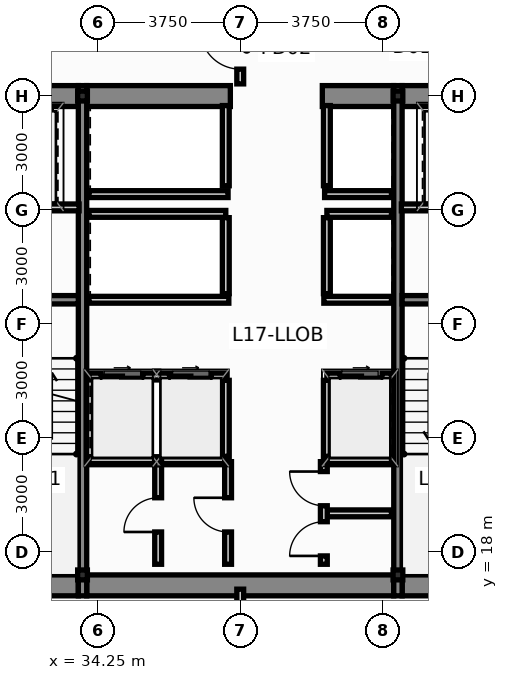
"""IFC4 building model, lengths in metres.
Left out: names, types, materials, properties, quantities, classifications, styles, units other than length and angle.
Written with IfcOpenShell. Run it as: python <this file> out.ifc"""

import sys

from ifc_helpers import new_model, si_unit, direction, frame, frame_2d, origin, origin_2d, place, context, subcontext, project, spatial, rectangle, i_section, extrude, source, transform, mapped, element, fill, save


model = new_model("IFC4")
c1 = context("Model", 3, precision=1e-05, world=origin(), true_north=direction((0.0, 1.0)))
c2 = subcontext(c1, "Body", "Model", "MODEL_VIEW")
j1 = project(units=[si_unit("LENGTHUNIT", "METRE"), si_unit("PLANEANGLEUNIT", "RADIAN")], contexts=[c1])
p1 = place(None, origin())
s1 = spatial("IfcSite", under=j1, at=p1, CompositionType="ELEMENT")
p2 = place(p1, origin())
s2 = spatial("IfcBuilding", under=s1, at=p2, CompositionType="ELEMENT")
p3 = place(p2, frame((0.0, 0.0, 67.75)))
s3 = spatial("IfcBuildingStorey", under=s2, at=p3, CompositionType="ELEMENT", Elevation=67.75)
m1 = source(origin(), c2, "Body", "SweptSolid", [
    extrude(i_section(OverallWidth=0.256, OverallDepth=0.26, WebThickness=0.01, FlangeThickness=0.017, at=origin_2d()), origin(), (0.0, 0.0, 1.0), 3.65),
])
for number, where, z_axis, x_axis in (
    (1, (33.85, 17.4, 0.0), (0.0, 0.0, 1.0), (1.0, 0.0, 0.0)),
    (2, (42.15, 17.4, 0.0), (0.0, 0.0, 1.0), (1.0, 0.0, 0.0)),
    (3, (33.85, 30.0, 0.0), (0.0, 0.0, 1.0), (1.0, 0.0, 0.0)),
    (4, (42.15, 30.0, 0.0), (0.0, 0.0, 1.0), (1.0, 0.0, 0.0)),
):
    element("IfcColumn", number, at=place(p3, frame(where, z_axis=z_axis, x_axis=x_axis)), inside=s3, PredefinedType="COLUMN", context=c2, shape_type="MappedRepresentation", body=[
        mapped(m1, transform((0.0, 0.0, 0.0), scale=1.0)),
    ])
p4 = place(p3, frame((30.84, 17.125, 0.0), z_axis=(0.0, 0.0, 1.0), x_axis=(1.0, 0.0, 0.0)))
e5 = element("IfcWall", 5, at=p4, inside=s3, PredefinedType="SHEAR", context=c2, shape_type="SweptSolid", body=[
    extrude(rectangle(XDim=2.9, YDim=0.55, at=frame_2d((1.45, 0.0))), origin(), (0.0, 0.0, 1.0), 3.65),
])
p5 = place(p3, frame((33.96, 17.125, 0.0), z_axis=(0.0, 0.0, 1.0), x_axis=(1.0, 0.0, 0.0)))
e6 = element("IfcWall", 6, at=p5, inside=s3, PredefinedType="SHEAR", context=c2, shape_type="SweptSolid", body=[
    extrude(rectangle(XDim=8.08, YDim=0.55, at=frame_2d((4.04, 0.0))), origin(), (0.0, 0.0, 1.0), 3.65),
])
for number, where, z_axis, x_axis in (
    (7, (42.26, 17.125, 0.0), (0.0, 0.0, 1.0), (1.0, 0.0, 0.0)),
    (8, (30.84, 30.0, 0.0), (0.0, 0.0, 1.0), (1.0, 0.0, 0.0)),
):
    element("IfcWall", number, at=place(p3, frame(where, z_axis=z_axis, x_axis=x_axis)), inside=s3, PredefinedType="SHEAR", context=c2, shape_type="SweptSolid", body=[
        extrude(rectangle(XDim=2.9, YDim=0.55, at=frame_2d((1.45, 0.0))), origin(), (0.0, 0.0, 1.0), 3.65),
    ])
p6 = place(p3, frame((33.96, 30.0, 0.0), z_axis=(0.0, 0.0, 1.0), x_axis=(1.0, 0.0, 0.0)))
e9 = element("IfcWall", 9, at=p6, inside=s3, PredefinedType="SHEAR", context=c2, shape_type="SweptSolid", body=[
    extrude(rectangle(XDim=3.78, YDim=0.55, at=frame_2d((1.89, 0.0))), origin(), (0.0, 0.0, 1.0), 3.65),
])
p7 = place(p3, frame((40.16, 30.0, 0.0), z_axis=(0.0, 0.0, 1.0), x_axis=(1.0, 0.0, 0.0)))
e10 = element("IfcWall", 10, at=p7, inside=s3, PredefinedType="SHEAR", context=c2, shape_type="SweptSolid", body=[
    extrude(rectangle(XDim=1.88, YDim=0.55, at=frame_2d((0.94, 0.0))), origin(), (0.0, 0.0, 1.0), 3.65),
])
p8 = place(p3, frame((42.26, 30.0, 0.0), z_axis=(0.0, 0.0, 1.0), x_axis=(1.0, 0.0, 0.0)))
e11 = element("IfcWall", 11, at=p8, inside=s3, PredefinedType="SHEAR", context=c2, shape_type="SweptSolid", body=[
    extrude(rectangle(XDim=2.9, YDim=0.55, at=frame_2d((1.45, 0.0))), origin(), (0.0, 0.0, 1.0), 3.65),
])
for number, where, z_axis, x_axis in (
    (12, (33.85, 16.85, 0.0), (0.0, 0.0, 1.0), (0.0, 1.0, 0.0)),
    (13, (42.15, 16.85, 0.0), (0.0, 0.0, 1.0), (0.0, 1.0, 0.0)),
):
    element("IfcWall", number, at=place(p3, frame(where, z_axis=z_axis, x_axis=x_axis)), inside=s3, PredefinedType="SHEAR", context=c2, shape_type="SweptSolid", body=[
        extrude(rectangle(XDim=13.425, YDim=0.22, at=frame_2d((6.712, 0.0))), origin(), (0.0, 0.0, 1.0), 3.65),
    ])
for number, where, z_axis, x_axis in (
    (14, (30.84, 24.64, 0.0), (0.0, 0.0, 1.0), (1.0, 0.0, 0.0)),
    (15, (42.26, 24.64, 0.0), (0.0, 0.0, 1.0), (1.0, 0.0, 0.0)),
):
    element("IfcWall", number, at=place(p3, frame(where, z_axis=z_axis, x_axis=x_axis)), inside=s3, PredefinedType="SHEAR", context=c2, shape_type="SweptSolid", body=[
        extrude(rectangle(XDim=2.9, YDim=0.22, at=frame_2d((1.45, 0.0))), origin(), (0.0, 0.0, 1.0), 3.65),
    ])
p9 = place(p3, frame((34.02, 22.62, 0.0), z_axis=(0.0, 0.0, 1.0), x_axis=(1.0, 0.0, 0.0)))
e16 = element("IfcWall", 16, at=p9, inside=s3, PredefinedType="PARTITIONING", context=c2, shape_type="SweptSolid", body=[
    extrude(rectangle(XDim=3.6, YDim=0.18, at=frame_2d((1.8, 0.0))), origin(), (0.0, 0.0, 1.0), 3.4),
])
p10 = place(p9, frame((0.32, 0.0, 0.0)))
e17 = element("IfcOpeningElement", 17, at=p10, cuts=e16, PredefinedType="OPENING", context=c2, shape_type="SweptSolid", body=[
    extrude(rectangle(XDim=1.1, YDim=2.2, at=frame_2d((0.55, 1.1))), frame((0.0, 0.102, 0.0), z_axis=(0.0, -1.0, 0.0), x_axis=(1.0, 0.0, 0.0)), (0.0, 0.0, 1.0), 0.204),
])
p11 = place(p9, frame((2.12, 0.0, 0.0)))
e18 = element("IfcOpeningElement", 18, at=p11, cuts=e16, PredefinedType="OPENING", context=c2, shape_type="SweptSolid", body=[
    extrude(rectangle(XDim=1.1, YDim=2.2, at=frame_2d((0.55, 1.1))), frame((0.0, 0.102, 0.0), z_axis=(0.0, -1.0, 0.0), x_axis=(1.0, 0.0, 0.0)), (0.0, 0.0, 1.0), 0.204),
])
p12 = place(p3, frame((40.28, 22.62, 0.0), z_axis=(0.0, 0.0, 1.0), x_axis=(1.0, 0.0, 0.0)))
e19 = element("IfcWall", 19, at=p12, inside=s3, PredefinedType="PARTITIONING", context=c2, shape_type="SweptSolid", body=[
    extrude(rectangle(XDim=1.7, YDim=0.18, at=frame_2d((0.85, 0.0))), origin(), (0.0, 0.0, 1.0), 3.4),
])
p13 = place(p12, frame((0.35, 0.0, 0.0)))
e20 = element("IfcOpeningElement", 20, at=p13, cuts=e19, PredefinedType="OPENING", context=c2, shape_type="SweptSolid", body=[
    extrude(rectangle(XDim=1.1, YDim=2.2, at=frame_2d((0.55, 1.1))), frame((0.0, 0.102, 0.0), z_axis=(0.0, -1.0, 0.0), x_axis=(1.0, 0.0, 0.0)), (0.0, 0.0, 1.0), 0.204),
])
for number, where, z_axis, x_axis in (
    (21, (37.62, 20.52, 0.0), (0.0, 0.0, 1.0), (0.0, 1.0, 0.0)),
    (22, (40.28, 20.52, 0.0), (0.0, 0.0, 1.0), (0.0, 1.0, 0.0)),
):
    element("IfcWall", number, at=place(p3, frame(where, z_axis=z_axis, x_axis=x_axis)), inside=s3, PredefinedType="PARTITIONING", context=c2, shape_type="SweptSolid", body=[
        extrude(rectangle(XDim=2.0, YDim=0.18, at=frame_2d((1.0, 0.0))), origin(), (0.0, 0.0, 1.0), 3.4),
    ])
p14 = place(p3, frame((34.02, 26.9, 0.0), z_axis=(0.0, 0.0, 1.0), x_axis=(1.0, 0.0, 0.0)))
e23 = element("IfcWall", 23, at=p14, inside=s3, PredefinedType="PARTITIONING", context=c2, shape_type="SweptSolid", body=[
    extrude(rectangle(XDim=3.6, YDim=0.18, at=frame_2d((1.8, 0.0))), origin(), (0.0, 0.0, 1.0), 3.4),
])
p15 = place(p3, frame((40.28, 26.9, 0.0), z_axis=(0.0, 0.0, 1.0), x_axis=(1.0, 0.0, 0.0)))
e24 = element("IfcWall", 24, at=p15, inside=s3, PredefinedType="PARTITIONING", context=c2, shape_type="SweptSolid", body=[
    extrude(rectangle(XDim=1.7, YDim=0.18, at=frame_2d((0.85, 0.0))), origin(), (0.0, 0.0, 1.0), 3.4),
])
for number, where, z_axis, x_axis in (
    (25, (37.62, 24.8, 0.0), (0.0, 0.0, 1.0), (0.0, 1.0, 0.0)),
    (26, (40.28, 24.8, 0.0), (0.0, 0.0, 1.0), (0.0, 1.0, 0.0)),
):
    element("IfcWall", number, at=place(p3, frame(where, z_axis=z_axis, x_axis=x_axis)), inside=s3, PredefinedType="PARTITIONING", context=c2, shape_type="SweptSolid", body=[
        extrude(rectangle(XDim=2.0, YDim=0.18, at=frame_2d((1.0, 0.0))), origin(), (0.0, 0.0, 1.0), 3.4),
    ])
p16 = place(p3, frame((34.02, 24.64, 0.0), z_axis=(0.0, 0.0, 1.0), x_axis=(1.0, 0.0, 0.0)))
e27 = element("IfcWall", 27, at=p16, inside=s3, PredefinedType="PARTITIONING", context=c2, shape_type="SweptSolid", body=[
    extrude(rectangle(XDim=3.68, YDim=0.18, at=frame_2d((1.84, 0.0))), origin(), (0.0, 0.0, 1.0), 3.4),
])
p17 = place(p3, frame((40.2, 24.64, 0.0), z_axis=(0.0, 0.0, 1.0), x_axis=(1.0, 0.0, 0.0)))
e28 = element("IfcWall", 28, at=p17, inside=s3, PredefinedType="PARTITIONING", context=c2, shape_type="SweptSolid", body=[
    extrude(rectangle(XDim=1.78, YDim=0.18, at=frame_2d((0.89, 0.0))), origin(), (0.0, 0.0, 1.0), 3.4),
])
p18 = place(p3, frame((34.02, 27.42, 0.0), z_axis=(0.0, 0.0, 1.0), x_axis=(1.0, 0.0, 0.0)))
e29 = element("IfcWall", 29, at=p18, inside=s3, PredefinedType="PARTITIONING", context=c2, shape_type="SweptSolid", body=[
    extrude(rectangle(XDim=3.66, YDim=0.18, at=frame_2d((1.83, 0.0))), origin(), (0.0, 0.0, 1.0), 3.4),
])
p19 = place(p3, frame((40.22, 27.42, 0.0), z_axis=(0.0, 0.0, 1.0), x_axis=(1.0, 0.0, 0.0)))
e30 = element("IfcWall", 30, at=p19, inside=s3, PredefinedType="PARTITIONING", context=c2, shape_type="SweptSolid", body=[
    extrude(rectangle(XDim=1.76, YDim=0.18, at=frame_2d((0.88, 0.0))), origin(), (0.0, 0.0, 1.0), 3.4),
])
for number, where, z_axis, x_axis in (
    (31, (37.62, 27.64, 0.0), (0.0, 0.0, 1.0), (0.0, 1.0, 0.0)),
    (32, (40.28, 27.64, 0.0), (0.0, 0.0, 1.0), (0.0, 1.0, 0.0)),
):
    element("IfcWall", number, at=place(p3, frame(where, z_axis=z_axis, x_axis=x_axis)), inside=s3, PredefinedType="PARTITIONING", context=c2, shape_type="SweptSolid", body=[
        extrude(rectangle(XDim=2.11, YDim=0.18, at=frame_2d((1.055, 0.0))), origin(), (0.0, 0.0, 1.0), 3.4),
    ])
for number, where, z_axis, x_axis in (
    (33, (30.86, 27.07, 0.0), (0.0, 0.0, 1.0), (1.0, 0.0, 0.0)),
    (34, (42.24, 27.07, 0.0), (0.0, 0.0, 1.0), (1.0, 0.0, 0.0)),
):
    element("IfcWall", number, at=place(p3, frame(where, z_axis=z_axis, x_axis=x_axis)), inside=s3, PredefinedType="PARTITIONING", context=c2, shape_type="SweptSolid", body=[
        extrude(rectangle(XDim=2.9, YDim=0.18, at=frame_2d((1.45, 0.0))), origin(), (0.0, 0.0, 1.0), 3.4),
    ])
p20 = place(p3, frame((34.02, 20.42, 0.0), z_axis=(0.0, 0.0, 1.0), x_axis=(1.0, 0.0, 0.0)))
e35 = element("IfcWall", 35, at=p20, inside=s3, PredefinedType="PARTITIONING", context=c2, shape_type="SweptSolid", body=[
    extrude(rectangle(XDim=3.64, YDim=0.18, at=frame_2d((1.82, 0.0))), origin(), (0.0, 0.0, 1.0), 3.4),
])
p21 = place(p3, frame((40.22, 20.42, 0.0), z_axis=(0.0, 0.0, 1.0), x_axis=(1.0, 0.0, 0.0)))
e36 = element("IfcWall", 36, at=p21, inside=s3, PredefinedType="PARTITIONING", context=c2, shape_type="SweptSolid", body=[
    extrude(rectangle(XDim=1.76, YDim=0.18, at=frame_2d((0.88, 0.0))), origin(), (0.0, 0.0, 1.0), 3.4),
])
p22 = place(p3, frame((35.84, 17.68, 0.0), z_axis=(0.0, 0.0, 1.0), x_axis=(0.0, 1.0, 0.0)))
e37 = element("IfcWall", 37, at=p22, inside=s3, PredefinedType="PARTITIONING", context=c2, shape_type="SweptSolid", body=[
    extrude(rectangle(XDim=2.7, YDim=0.18, at=frame_2d((1.35, 0.0))), origin(), (0.0, 0.0, 1.0), 3.4),
])
p23 = place(p22, frame((0.85, 0.0, 0.0)))
e38 = element("IfcOpeningElement", 38, at=p23, cuts=e37, PredefinedType="OPENING", context=c2, shape_type="SweptSolid", body=[
    extrude(rectangle(XDim=0.9, YDim=2.1, at=frame_2d((0.45, 1.05))), frame((0.0, 0.102, 0.0), z_axis=(0.0, -1.0, 0.0), x_axis=(1.0, 0.0, 0.0)), (0.0, 0.0, 1.0), 0.204),
])
p24 = place(p3, frame((37.68, 17.68, 0.0), z_axis=(0.0, 0.0, 1.0), x_axis=(0.0, 1.0, 0.0)))
e39 = element("IfcWall", 39, at=p24, inside=s3, PredefinedType="PARTITIONING", context=c2, shape_type="SweptSolid", body=[
    extrude(rectangle(XDim=2.7, YDim=0.18, at=frame_2d((1.35, 0.0))), origin(), (0.0, 0.0, 1.0), 3.4),
])
p25 = place(p24, frame((0.85, 0.0, 0.0)))
e40 = element("IfcOpeningElement", 40, at=p25, cuts=e39, PredefinedType="OPENING", context=c2, shape_type="SweptSolid", body=[
    extrude(rectangle(XDim=0.9, YDim=2.1, at=frame_2d((0.45, 1.05))), frame((0.0, 0.102, 0.0), z_axis=(0.0, -1.0, 0.0), x_axis=(1.0, 0.0, 0.0)), (0.0, 0.0, 1.0), 0.204),
])
p26 = place(p3, frame((40.28, 19.02, 0.0), z_axis=(0.0, 0.0, 1.0), x_axis=(1.0, 0.0, 0.0)))
e41 = element("IfcWall", 41, at=p26, inside=s3, PredefinedType="PARTITIONING", context=c2, shape_type="SweptSolid", body=[
    extrude(rectangle(XDim=1.7, YDim=0.18, at=frame_2d((0.85, 0.0))), origin(), (0.0, 0.0, 1.0), 3.4),
])
p27 = place(p3, frame((40.2, 17.68, 0.0), z_axis=(0.0, 0.0, 1.0), x_axis=(0.0, 1.0, 0.0)))
e42 = element("IfcWall", 42, at=p27, inside=s3, PredefinedType="PARTITIONING", context=c2, shape_type="SweptSolid", body=[
    extrude(rectangle(XDim=2.7, YDim=0.18, at=frame_2d((1.35, 0.0))), origin(), (0.0, 0.0, 1.0), 3.4),
])
p28 = place(p27, frame((0.22, 0.0, 0.0)))
e43 = element("IfcOpeningElement", 43, at=p28, cuts=e42, PredefinedType="OPENING", context=c2, shape_type="SweptSolid", body=[
    extrude(rectangle(XDim=0.9, YDim=2.1, at=frame_2d((0.45, 1.05))), frame((0.0, 0.102, 0.0), z_axis=(0.0, -1.0, 0.0), x_axis=(1.0, 0.0, 0.0)), (0.0, 0.0, 1.0), 0.204),
])
p29 = place(p27, frame((1.54, 0.0, 0.0)))
e44 = element("IfcOpeningElement", 44, at=p29, cuts=e42, PredefinedType="OPENING", context=c2, shape_type="SweptSolid", body=[
    extrude(rectangle(XDim=0.9, YDim=2.1, at=frame_2d((0.45, 1.05))), frame((0.0, 0.102, 0.0), z_axis=(0.0, -1.0, 0.0), x_axis=(1.0, 0.0, 0.0)), (0.0, 0.0, 1.0), 0.204),
])
p30 = place(p3, frame((38.0, 15.205, 0.0), z_axis=(0.0, 0.0, 1.0), x_axis=(0.0, 1.0, 0.0)))
e45 = element("IfcWall", 45, at=p30, inside=s3, PredefinedType="PARTITIONING", context=c2, shape_type="SweptSolid", body=[
    extrude(rectangle(XDim=1.82, YDim=0.18, at=frame_2d((0.91, 0.0))), origin(), (0.0, 0.0, 1.0), 3.4),
])
p31 = place(p30, frame((0.385, 0.0, 0.0)))
e46 = element("IfcOpeningElement", 46, at=p31, cuts=e45, PredefinedType="OPENING", context=c2, shape_type="SweptSolid", body=[
    extrude(rectangle(XDim=1.05, YDim=2.15, at=frame_2d((0.525, 1.075))), frame((0.0, 0.102, 0.0), z_axis=(0.0, -1.0, 0.0), x_axis=(1.0, 0.0, 0.0)), (0.0, 0.0, 1.0), 0.204),
])
p32 = place(p3, frame((38.0, 30.32, 0.0), z_axis=(0.0, 0.0, 1.0), x_axis=(0.0, 1.0, 0.0)))
e47 = element("IfcWall", 47, at=p32, inside=s3, PredefinedType="PARTITIONING", context=c2, shape_type="SweptSolid", body=[
    extrude(rectangle(XDim=1.825, YDim=0.18, at=frame_2d((0.913, 0.0))), origin(), (0.0, 0.0, 1.0), 3.4),
])
p33 = place(p32, frame((0.388, 0.0, 0.0)))
e48 = element("IfcOpeningElement", 48, at=p33, cuts=e47, PredefinedType="OPENING", context=c2, shape_type="SweptSolid", body=[
    extrude(rectangle(XDim=1.05, YDim=2.15, at=frame_2d((0.525, 1.075))), frame((0.0, 0.102, 0.0), z_axis=(0.0, -1.0, 0.0), x_axis=(1.0, 0.0, 0.0)), (0.0, 0.0, 1.0), 0.204),
])
p34 = place(p10, origin())
e49 = element("IfcDoor", 49, at=p34, inside=s3, OperationType="SLIDING_TO_LEFT", PredefinedType="DOOR", context=c2, shape_type="SweptSolid", body=[
    extrude(rectangle(XDim=1.1, YDim=2.2, at=frame_2d((0.55, 1.1))), frame((0.0, 0.025, 0.0), z_axis=(0.0, -1.0, 0.0), x_axis=(1.0, 0.0, 0.0)), (0.0, 0.0, 1.0), 0.05),
])
fill(e17, e49)
p35 = place(p11, origin())
e50 = element("IfcDoor", 50, at=p35, inside=s3, OperationType="SLIDING_TO_RIGHT", PredefinedType="DOOR", context=c2, shape_type="SweptSolid", body=[
    extrude(rectangle(XDim=1.1, YDim=2.2, at=frame_2d((0.55, 1.1))), frame((0.0, 0.025, 0.0), z_axis=(0.0, -1.0, 0.0), x_axis=(1.0, 0.0, 0.0)), (0.0, 0.0, 1.0), 0.05),
])
fill(e18, e50)
p36 = place(p13, origin())
e51 = element("IfcDoor", 51, at=p36, inside=s3, OperationType="SLIDING_TO_LEFT", PredefinedType="DOOR", context=c2, shape_type="SweptSolid", body=[
    extrude(rectangle(XDim=1.1, YDim=2.2, at=frame_2d((0.55, 1.1))), frame((0.0, 0.025, 0.0), z_axis=(0.0, -1.0, 0.0), x_axis=(1.0, 0.0, 0.0)), (0.0, 0.0, 1.0), 0.05),
])
fill(e20, e51)
p37 = place(p23, origin())
e52 = element("IfcDoor", 52, at=p37, inside=s3, OperationType="SINGLE_SWING_LEFT", PredefinedType="DOOR", context=c2, shape_type="SweptSolid", body=[
    extrude(rectangle(XDim=0.9, YDim=2.1, at=frame_2d((0.45, 1.05))), frame((0.0, 0.025, 0.0), z_axis=(0.0, -1.0, 0.0), x_axis=(1.0, 0.0, 0.0)), (0.0, 0.0, 1.0), 0.05),
])
fill(e38, e52)
p38 = place(p25, origin())
e53 = element("IfcDoor", 53, at=p38, inside=s3, OperationType="SINGLE_SWING_RIGHT", PredefinedType="DOOR", context=c2, shape_type="SweptSolid", body=[
    extrude(rectangle(XDim=0.9, YDim=2.1, at=frame_2d((0.45, 1.05))), frame((0.0, 0.025, 0.0), z_axis=(0.0, -1.0, 0.0), x_axis=(1.0, 0.0, 0.0)), (0.0, 0.0, 1.0), 0.05),
])
fill(e40, e53)
p39 = place(p28, origin())
e54 = element("IfcDoor", 54, at=p39, inside=s3, OperationType="SINGLE_SWING_LEFT", PredefinedType="DOOR", context=c2, shape_type="SweptSolid", body=[
    extrude(rectangle(XDim=0.9, YDim=2.1, at=frame_2d((0.45, 1.05))), frame((0.0, 0.025, 0.0), z_axis=(0.0, -1.0, 0.0), x_axis=(1.0, 0.0, 0.0)), (0.0, 0.0, 1.0), 0.05),
])
fill(e43, e54)
p40 = place(p29, origin())
e55 = element("IfcDoor", 55, at=p40, inside=s3, OperationType="SINGLE_SWING_RIGHT", PredefinedType="DOOR", context=c2, shape_type="SweptSolid", body=[
    extrude(rectangle(XDim=0.9, YDim=2.1, at=frame_2d((0.45, 1.05))), frame((0.0, 0.025, 0.0), z_axis=(0.0, -1.0, 0.0), x_axis=(1.0, 0.0, 0.0)), (0.0, 0.0, 1.0), 0.05),
])
fill(e44, e55)
p41 = place(p33, origin())
e56 = element("IfcDoor", 56, at=p41, inside=s3, OperationType="SINGLE_SWING_RIGHT", PredefinedType="DOOR", context=c2, shape_type="SweptSolid", body=[
    extrude(rectangle(XDim=1.05, YDim=2.15, at=frame_2d((0.525, 1.075))), frame((0.0, 0.025, 0.0), z_axis=(0.0, -1.0, 0.0), x_axis=(1.0, 0.0, 0.0)), (0.0, 0.0, 1.0), 0.05),
])
fill(e48, e56)
save(model, sys.argv[1])
